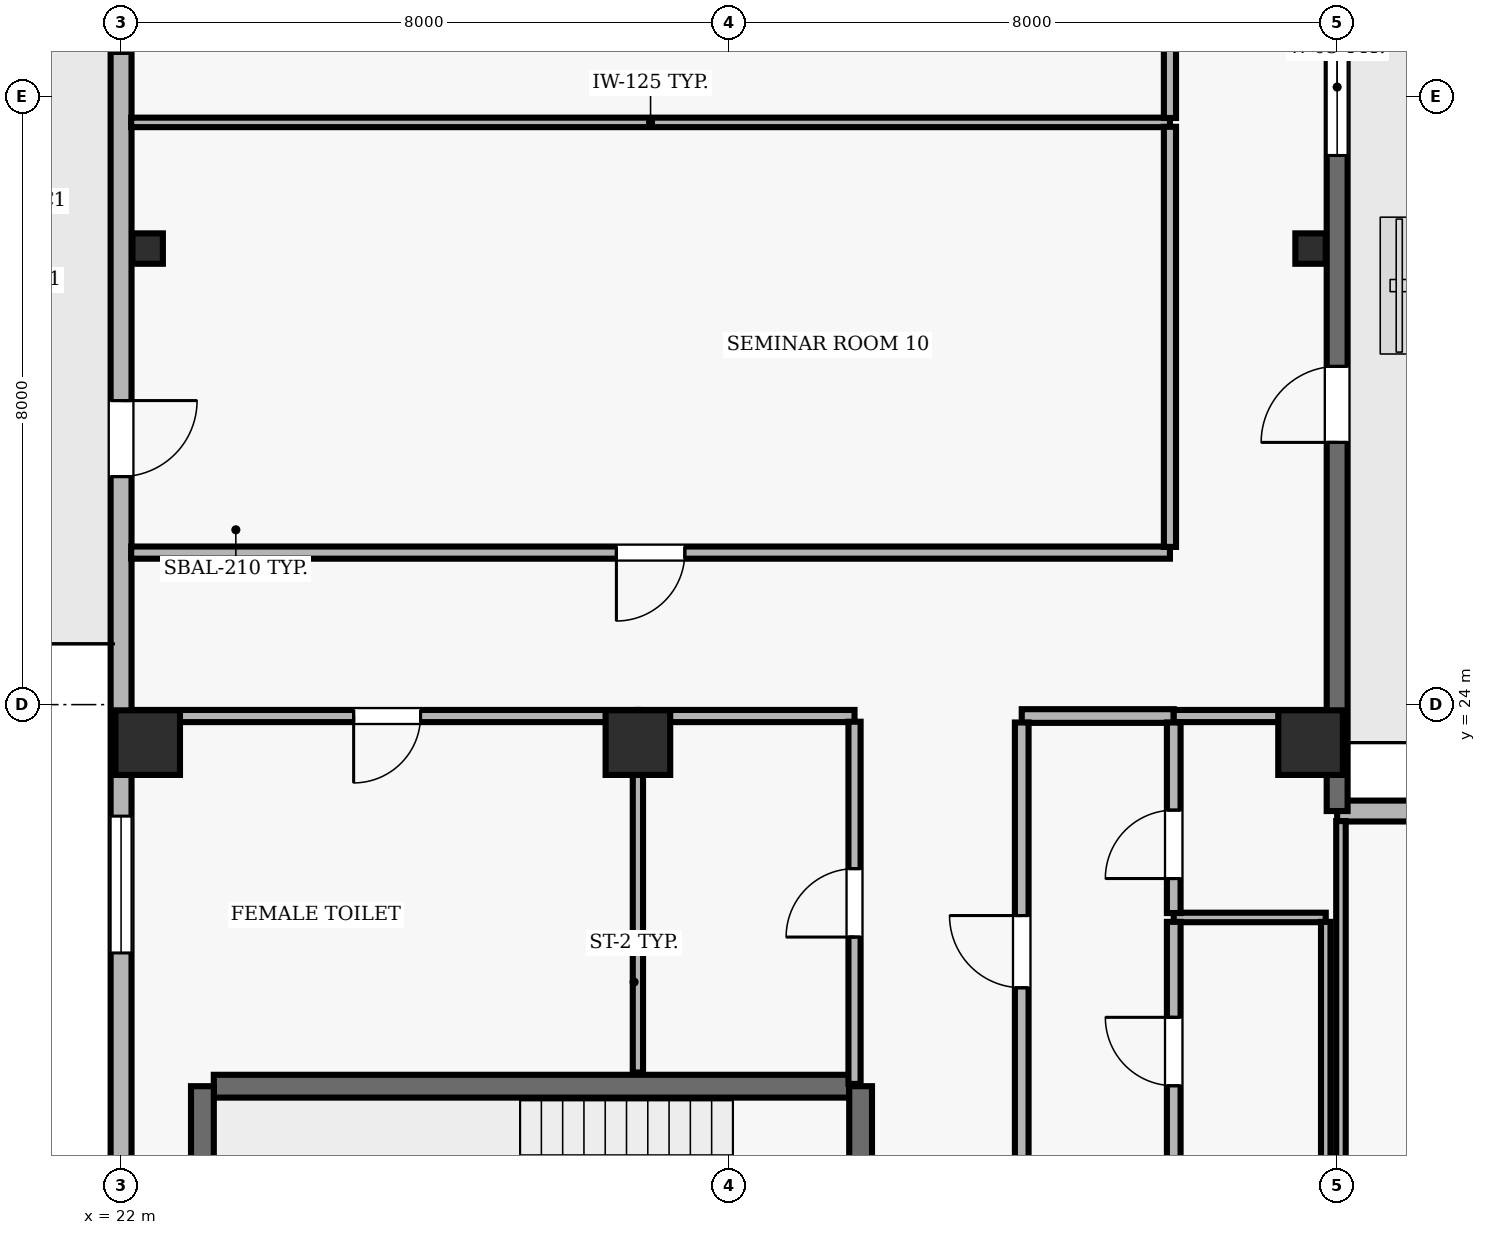
"""IFC4 building model, lengths in metres.
Left out: names, types, materials, properties, quantities, classifications, styles, units other than length and angle.
Written with IfcOpenShell. Run it as: python <this file> out.ifc"""

import sys

from ifc_helpers import new_model, si_unit, direction, frame, frame_2d, origin, origin_2d, place, context, subcontext, project, spatial, rectangle, hollow_rectangle, extrude, element, fill, save


model = new_model("IFC4")
c1 = context("Model", 3, precision=1e-05, world=origin(), true_north=direction((0.0, 1.0)))
c2 = subcontext(c1, "Body", "Model", "MODEL_VIEW")
j1 = project(units=[si_unit("LENGTHUNIT", "METRE"), si_unit("PLANEANGLEUNIT", "RADIAN")], contexts=[c1])
p1 = place(None, origin())
s1 = spatial("IfcSite", under=j1, at=p1, CompositionType="ELEMENT")
p2 = place(p1, origin())
s2 = spatial("IfcBuilding", under=s1, at=p2, CompositionType="ELEMENT")
p3 = place(p2, frame((0.0, 0.0, 271.6)))
s3 = spatial("IfcBuildingStorey", under=s2, at=p3, CompositionType="ELEMENT", Elevation=271.6)
for number, where, z_axis, x_axis in (
    (1, (22.35, 23.5, 0.0), (0.0, 0.0, 1.0), (1.0, 0.0, 0.0)),
    (2, (28.8, 23.5, 0.0), (0.0, 0.0, 1.0), (1.0, 0.0, 0.0)),
    (3, (37.65, 23.5, 0.0), (0.0, 0.0, 1.0), (1.0, 0.0, 0.0)),
):
    element("IfcColumn", number, at=place(p3, frame(where, z_axis=z_axis, x_axis=x_axis)), inside=s3, PredefinedType="COLUMN", context=c2, shape_type="SweptSolid", body=[
        extrude(rectangle(XDim=0.85, YDim=0.85, at=origin_2d()), origin(), (0.0, 0.0, 1.0), 3.9),
    ])
for number, where, z_axis, x_axis in (
    (4, (22.35, 30.0, 0.0), (0.0, 0.0, 1.0), (1.0, 0.0, 0.0)),
    (5, (37.65, 30.0, 0.0), (0.0, 0.0, 1.0), (1.0, 0.0, 0.0)),
):
    element("IfcColumn", number, at=place(p3, frame(where, z_axis=z_axis, x_axis=x_axis)), inside=s3, PredefinedType="COLUMN", context=c2, shape_type="SweptSolid", body=[
        extrude(hollow_rectangle(XDim=0.4, YDim=0.4, WallThickness=0.02, at=origin_2d()), origin(), (0.0, 0.0, 1.0), 3.9),
    ])
p4 = place(p3, frame((43.0, 22.6, 0.0), z_axis=(0.0, 0.0, 1.0), x_axis=(-1.0, 0.0, 0.0)))
e6 = element("IfcWall", 6, at=p4, inside=s3, PredefinedType="SOLIDWALL", context=c2, shape_type="SweptSolid", body=[
    extrude(rectangle(XDim=5.0, YDim=0.275, at=frame_2d((2.5, 0.0))), origin(), (0.0, 0.0, 1.0), 3.69),
])
p5 = place(p3, frame((38.0, 22.6, 0.0), z_axis=(0.0, 0.0, 1.0), x_axis=(0.0, 1.0, 0.0)))
e7 = element("IfcWall", 7, at=p5, inside=s3, PredefinedType="SOLIDWALL", context=c2, shape_type="SweptSolid", body=[
    extrude(rectangle(XDim=12.7, YDim=0.275, at=frame_2d((6.35, 0.0))), origin(), (0.0, 0.0, 1.0), 3.69),
])
p6 = place(p5, frame((4.85, 0.0, 0.0)))
e8 = element("IfcOpeningElement", 8, at=p6, cuts=e7, PredefinedType="OPENING", context=c2, shape_type="SweptSolid", body=[
    extrude(rectangle(XDim=1.0, YDim=2.2, at=frame_2d((0.5, 1.1))), frame((0.0, 0.147, 0.0), z_axis=(0.0, -1.0, 0.0), x_axis=(1.0, 0.0, 0.0)), (0.0, 0.0, 1.0), 0.295),
])
p7 = place(p5, frame((8.625, 0.0, 0.9)))
e9 = element("IfcOpeningElement", 9, at=p7, cuts=e7, PredefinedType="OPENING", context=c2, shape_type="SweptSolid", body=[
    extrude(rectangle(XDim=1.8, YDim=1.6, at=frame_2d((0.9, 0.8))), frame((0.0, 0.147, 0.0), z_axis=(0.0, -1.0, 0.0), x_axis=(1.0, 0.0, 0.0)), (0.0, 0.0, 1.0), 0.295),
])
p8 = place(p3, frame((22.0, 35.3, 0.0), z_axis=(0.0, 0.0, 1.0), x_axis=(0.0, -1.0, 0.0)))
e10 = element("IfcWall", 10, at=p8, inside=s3, PredefinedType="SOLIDWALL", context=c2, shape_type="SweptSolid", body=[
    extrude(rectangle(XDim=32.8, YDim=0.275, at=frame_2d((16.4, 0.0))), origin(), (0.0, 0.0, 1.0), 3.69),
])
p9 = place(p8, frame((7.3, 0.0, 0.0)))
e11 = element("IfcOpeningElement", 11, at=p9, cuts=e10, PredefinedType="OPENING", context=c2, shape_type="SweptSolid", body=[
    extrude(rectangle(XDim=1.0, YDim=2.2, at=frame_2d((0.5, 1.1))), frame((0.0, 0.147, 0.0), z_axis=(0.0, -1.0, 0.0), x_axis=(1.0, 0.0, 0.0)), (0.0, 0.0, 1.0), 0.295),
])
p10 = place(p8, frame((0.933, 0.0, 0.9)))
e12 = element("IfcOpeningElement", 12, at=p10, cuts=e10, PredefinedType="OPENING", context=c2, shape_type="SweptSolid", body=[
    extrude(rectangle(XDim=1.8, YDim=1.8, at=frame_2d((0.9, 0.9))), frame((0.0, 0.147, 0.0), z_axis=(0.0, -1.0, 0.0), x_axis=(1.0, 0.0, 0.0)), (0.0, 0.0, 1.0), 0.295),
])
p11 = place(p8, frame((12.767, 0.0, 0.9)))
e13 = element("IfcOpeningElement", 13, at=p11, cuts=e10, PredefinedType="OPENING", context=c2, shape_type="SweptSolid", body=[
    extrude(rectangle(XDim=1.8, YDim=1.8, at=frame_2d((0.9, 0.9))), frame((0.0, 0.147, 0.0), z_axis=(0.0, -1.0, 0.0), x_axis=(1.0, 0.0, 0.0)), (0.0, 0.0, 1.0), 0.295),
])
p12 = place(p8, frame((18.233, 0.0, 0.9)))
e14 = element("IfcOpeningElement", 14, at=p12, cuts=e10, PredefinedType="OPENING", context=c2, shape_type="SweptSolid", body=[
    extrude(rectangle(XDim=1.8, YDim=1.8, at=frame_2d((0.9, 0.9))), frame((0.0, 0.147, 0.0), z_axis=(0.0, -1.0, 0.0), x_axis=(1.0, 0.0, 0.0)), (0.0, 0.0, 1.0), 0.295),
])
p13 = place(p8, frame((23.7, 0.0, 0.9)))
e15 = element("IfcOpeningElement", 15, at=p13, cuts=e10, PredefinedType="OPENING", context=c2, shape_type="SweptSolid", body=[
    extrude(rectangle(XDim=1.8, YDim=1.8, at=frame_2d((0.9, 0.9))), frame((0.0, 0.147, 0.0), z_axis=(0.0, -1.0, 0.0), x_axis=(1.0, 0.0, 0.0)), (0.0, 0.0, 1.0), 0.295),
])
p14 = place(p3, frame((31.58, 18.98, 0.0), z_axis=(0.0, 0.0, 1.0), x_axis=(-1.0, 0.0, 0.0)))
e16 = element("IfcWall", 16, at=p14, inside=s3, PredefinedType="SHEAR", context=c2, shape_type="SweptSolid", body=[
    extrude(rectangle(XDim=8.36, YDim=0.3, at=frame_2d((4.18, 0.0))), origin(), (0.0, 0.0, 1.0), 3.69),
])
p15 = place(p3, frame((23.07, 18.98, 0.0), z_axis=(0.0, 0.0, 1.0), x_axis=(0.0, -1.0, 0.0)))
e17 = element("IfcWall", 17, at=p15, inside=s3, PredefinedType="SHEAR", context=c2, shape_type="SweptSolid", body=[
    extrude(rectangle(XDim=3.51, YDim=0.3, at=frame_2d((1.755, 0.0))), origin(), (0.0, 0.0, 1.0), 3.69),
])
p16 = place(p3, frame((31.73, 15.47, 0.0), z_axis=(0.0, 0.0, 1.0), x_axis=(0.0, 1.0, 0.0)))
e18 = element("IfcWall", 18, at=p16, inside=s3, PredefinedType="SHEAR", context=c2, shape_type="SweptSolid", body=[
    extrude(rectangle(XDim=3.51, YDim=0.3, at=frame_2d((1.755, 0.0))), origin(), (0.0, 0.0, 1.0), 3.69),
])
p17 = place(p16, frame((1.18, 0.0, 0.0)))
e19 = element("IfcOpeningElement", 19, at=p17, cuts=e18, PredefinedType="OPENING", context=c2, shape_type="SweptSolid", body=[
    extrude(rectangle(XDim=1.15, YDim=2.15, at=frame_2d((0.575, 1.075))), frame((0.0, 0.16, 0.0), z_axis=(0.0, -1.0, 0.0), x_axis=(1.0, 0.0, 0.0)), (0.0, 0.0, 1.0), 0.32),
])
p18 = place(p3, frame((28.8, 23.85, 0.0), z_axis=(0.0, 0.0, 1.0), x_axis=(-1.0, 0.0, 0.0)))
e20 = element("IfcWall", 20, at=p18, inside=s3, PredefinedType="PARTITIONING", context=c2, shape_type="SweptSolid", body=[
    extrude(rectangle(XDim=6.6, YDim=0.16, at=frame_2d((3.3, 0.0))), origin(), (0.0, 0.0, 1.0), 3.221),
])
p19 = place(p18, frame((2.86, 0.0, 0.0)))
e21 = element("IfcOpeningElement", 21, at=p19, cuts=e20, PredefinedType="OPENING", context=c2, shape_type="SweptSolid", body=[
    extrude(rectangle(XDim=0.88, YDim=2.1, at=frame_2d((0.44, 1.05))), frame((0.0, 0.09, 0.0), z_axis=(0.0, -1.0, 0.0), x_axis=(1.0, 0.0, 0.0)), (0.0, 0.0, 1.0), 0.18),
])
p20 = place(p3, frame((31.65, 23.85, 0.0), z_axis=(0.0, 0.0, 1.0), x_axis=(-1.0, 0.0, 0.0)))
e22 = element("IfcWall", 22, at=p20, inside=s3, PredefinedType="PARTITIONING", context=c2, shape_type="SweptSolid", body=[
    extrude(rectangle(XDim=2.85, YDim=0.16, at=frame_2d((1.425, 0.0))), origin(), (0.0, 0.0, 1.0), 3.221),
])
p21 = place(p3, frame((35.8, 26.0, 0.0), z_axis=(0.0, 0.0, 1.0), x_axis=(-1.0, 0.0, 0.0)))
e23 = element("IfcWall", 23, at=p21, inside=s3, PredefinedType="PARTITIONING", context=c2, shape_type="SweptSolid", body=[
    extrude(rectangle(XDim=13.667, YDim=0.16, at=frame_2d((6.833, 0.0))), origin(), (0.0, 0.0, 1.0), 3.69),
])
p22 = place(p21, frame((6.383, 0.0, 0.0)))
e24 = element("IfcOpeningElement", 24, at=p22, cuts=e23, PredefinedType="OPENING", context=c2, shape_type="SweptSolid", body=[
    extrude(rectangle(XDim=0.9, YDim=2.1, at=frame_2d((0.45, 1.05))), frame((0.0, 0.09, 0.0), z_axis=(0.0, -1.0, 0.0), x_axis=(1.0, 0.0, 0.0)), (0.0, 0.0, 1.0), 0.18),
])
p23 = place(p3, frame((35.8, 31.66, 0.0), z_axis=(0.0, 0.0, 1.0), x_axis=(-1.0, 0.0, 0.0)))
e25 = element("IfcWall", 25, at=p23, inside=s3, PredefinedType="PARTITIONING", context=c2, shape_type="SweptSolid", body=[
    extrude(rectangle(XDim=13.667, YDim=0.125, at=frame_2d((6.833, 0.0))), origin(), (0.0, 0.0, 1.0), 3.69),
])
p24 = place(p3, frame((35.85, 21.2, 0.0), z_axis=(0.0, 0.0, 1.0), x_axis=(1.0, 0.0, 0.0)))
e26 = element("IfcWall", 26, at=p24, inside=s3, PredefinedType="PARTITIONING", context=c2, shape_type="SweptSolid", body=[
    extrude(rectangle(XDim=2.0, YDim=0.125, at=frame_2d((1.0, 0.0))), origin(), (0.0, 0.0, 1.0), 3.69),
])
p25 = place(p3, frame((35.85, 23.85, 0.0), z_axis=(0.0, 0.0, 1.0), x_axis=(-1.0, 0.0, 0.0)))
e27 = element("IfcWall", 27, at=p25, inside=s3, PredefinedType="PARTITIONING", context=c2, shape_type="SweptSolid", body=[
    extrude(rectangle(XDim=2.0, YDim=0.18, at=frame_2d((1.0, 0.0))), origin(), (0.0, 0.0, 1.0), 3.221),
])
p26 = place(p3, frame((37.85, 23.85, 0.0), z_axis=(0.0, 0.0, 1.0), x_axis=(-1.0, 0.0, 0.0)))
e28 = element("IfcWall", 28, at=p26, inside=s3, PredefinedType="PARTITIONING", context=c2, shape_type="SweptSolid", body=[
    extrude(rectangle(XDim=2.0, YDim=0.16, at=frame_2d((1.0, 0.0))), origin(), (0.0, 0.0, 1.0), 3.221),
])
p27 = place(p3, frame((28.8, 23.775, 0.0), z_axis=(0.0, 0.0, 1.0), x_axis=(0.0, -1.0, 0.0)))
e29 = element("IfcWall", 29, at=p27, inside=s3, PredefinedType="PARTITIONING", context=c2, shape_type="SweptSolid", body=[
    extrude(rectangle(XDim=4.615, YDim=0.135, at=frame_2d((2.308, 0.0))), origin(), (0.0, 0.0, 1.0), 3.69),
])
p28 = place(p3, frame((31.65, 19.01, 0.0), z_axis=(0.0, 0.0, 1.0), x_axis=(0.0, 1.0, 0.0)))
e30 = element("IfcWall", 30, at=p28, inside=s3, PredefinedType="PARTITIONING", context=c2, shape_type="SweptSolid", body=[
    extrude(rectangle(XDim=4.765, YDim=0.16, at=frame_2d((2.382, 0.0))), origin(), (0.0, 0.0, 1.0), 3.69),
])
p29 = place(p28, frame((1.932, 0.0, 0.0)))
e31 = element("IfcOpeningElement", 31, at=p29, cuts=e30, PredefinedType="OPENING", context=c2, shape_type="SweptSolid", body=[
    extrude(rectangle(XDim=0.9, YDim=2.1, at=frame_2d((0.45, 1.05))), frame((0.0, 0.09, 0.0), z_axis=(0.0, -1.0, 0.0), x_axis=(1.0, 0.0, 0.0)), (0.0, 0.0, 1.0), 0.18),
])
p30 = place(p3, frame((33.85, 17.735, 0.0), z_axis=(0.0, 0.0, 1.0), x_axis=(0.0, 1.0, 0.0)))
e32 = element("IfcWall", 32, at=p30, inside=s3, PredefinedType="PARTITIONING", context=c2, shape_type="SweptSolid", body=[
    extrude(rectangle(XDim=6.03, YDim=0.18, at=frame_2d((3.015, 0.0))), origin(), (0.0, 0.0, 1.0), 3.69),
])
p31 = place(p30, frame((2.54, 0.0, 0.0)))
e33 = element("IfcOpeningElement", 33, at=p31, cuts=e32, PredefinedType="OPENING", context=c2, shape_type="SweptSolid", body=[
    extrude(rectangle(XDim=0.95, YDim=2.1, at=frame_2d((0.475, 1.05))), frame((0.0, 0.1, 0.0), z_axis=(0.0, -1.0, 0.0), x_axis=(1.0, 0.0, 0.0)), (0.0, 0.0, 1.0), 0.2),
])
p32 = place(p3, frame((35.8, 31.602, 0.0), z_axis=(0.0, 0.0, 1.0), x_axis=(0.0, -1.0, 0.0)))
e34 = element("IfcWall", 34, at=p32, inside=s3, PredefinedType="PARTITIONING", context=c2, shape_type="SweptSolid", body=[
    extrude(rectangle(XDim=5.527, YDim=0.16, at=frame_2d((2.764, 0.0))), origin(), (0.0, 0.0, 1.0), 3.69),
])
p33 = place(p3, frame((35.8, 37.313, 0.0), z_axis=(0.0, 0.0, 1.0), x_axis=(0.0, -1.0, 0.0)))
e35 = element("IfcWall", 35, at=p33, inside=s3, PredefinedType="PARTITIONING", context=c2, shape_type="SweptSolid", body=[
    extrude(rectangle(XDim=5.595, YDim=0.16, at=frame_2d((2.797, 0.0))), origin(), (0.0, 0.0, 1.0), 3.69),
])
p34 = place(p33, frame((2.348, 0.0, 0.0)))
e36 = element("IfcOpeningElement", 36, at=p34, cuts=e35, PredefinedType="OPENING", context=c2, shape_type="SweptSolid", body=[
    extrude(rectangle(XDim=0.9, YDim=2.1, at=frame_2d((0.45, 1.05))), frame((0.0, 0.09, 0.0), z_axis=(0.0, -1.0, 0.0), x_axis=(1.0, 0.0, 0.0)), (0.0, 0.0, 1.0), 0.18),
])
p35 = place(p3, frame((35.85, 17.73, 0.0), z_axis=(0.0, 0.0, 1.0), x_axis=(0.0, 1.0, 0.0)))
e37 = element("IfcWall", 37, at=p35, inside=s3, PredefinedType="PARTITIONING", context=c2, shape_type="SweptSolid", body=[
    extrude(rectangle(XDim=3.412, YDim=0.18, at=frame_2d((1.706, 0.0))), origin(), (0.0, 0.0, 1.0), 3.69),
])
p36 = place(p35, frame((1.256, 0.0, 0.0)))
e38 = element("IfcOpeningElement", 38, at=p36, cuts=e37, PredefinedType="OPENING", context=c2, shape_type="SweptSolid", body=[
    extrude(rectangle(XDim=0.9, YDim=2.1, at=frame_2d((0.45, 1.05))), frame((0.0, 0.1, 0.0), z_axis=(0.0, -1.0, 0.0), x_axis=(1.0, 0.0, 0.0)), (0.0, 0.0, 1.0), 0.2),
])
p37 = place(p3, frame((35.85, 21.258, 0.0), z_axis=(0.0, 0.0, 1.0), x_axis=(0.0, 1.0, 0.0)))
e39 = element("IfcWall", 39, at=p37, inside=s3, PredefinedType="PARTITIONING", context=c2, shape_type="SweptSolid", body=[
    extrude(rectangle(XDim=2.507, YDim=0.18, at=frame_2d((1.253, 0.0))), origin(), (0.0, 0.0, 1.0), 3.69),
])
p38 = place(p37, frame((0.454, 0.0, 0.0)))
e40 = element("IfcOpeningElement", 40, at=p38, cuts=e39, PredefinedType="OPENING", context=c2, shape_type="SweptSolid", body=[
    extrude(rectangle(XDim=0.9, YDim=2.1, at=frame_2d((0.45, 1.05))), frame((0.0, 0.1, 0.0), z_axis=(0.0, -1.0, 0.0), x_axis=(1.0, 0.0, 0.0)), (0.0, 0.0, 1.0), 0.2),
])
p39 = place(p3, frame((37.85, 17.65, 0.0), z_axis=(0.0, 0.0, 1.0), x_axis=(0.0, 1.0, 0.0)))
e41 = element("IfcWall", 41, at=p39, inside=s3, PredefinedType="PARTITIONING", context=c2, shape_type="SweptSolid", body=[
    extrude(rectangle(XDim=3.492, YDim=0.125, at=frame_2d((1.746, 0.0))), origin(), (0.0, 0.0, 1.0), 3.221),
])
p40 = place(p3, frame((38.05, 22.468, 0.0), z_axis=(0.0, 0.0, 1.0), x_axis=(0.0, -1.0, 0.0)))
e42 = element("IfcWall", 42, at=p40, inside=s3, PredefinedType="PARTITIONING", context=c2, shape_type="SweptSolid", body=[
    extrude(rectangle(XDim=6.393, YDim=0.125, at=frame_2d((3.197, 0.0))), origin(), (0.0, 0.0, 1.0), 3.221),
])
p41 = place(p6, origin())
e43 = element("IfcDoor", 43, at=p41, inside=s3, OperationType="SINGLE_SWING_LEFT", PredefinedType="DOOR", context=c2, shape_type="SweptSolid", body=[
    extrude(rectangle(XDim=1.0, YDim=2.2, at=frame_2d((0.5, 1.1))), frame((0.0, 0.025, 0.0), z_axis=(0.0, -1.0, 0.0), x_axis=(1.0, 0.0, 0.0)), (0.0, 0.0, 1.0), 0.05),
])
fill(e8, e43)
p42 = place(p7, origin())
e44 = element("IfcWindow", 44, at=p42, inside=s3, PartitioningType="SINGLE_PANEL", PredefinedType="WINDOW", context=c2, shape_type="SweptSolid", body=[
    extrude(rectangle(XDim=1.8, YDim=1.6, at=frame_2d((0.9, 0.8))), frame((0.0, 0.03, 0.0), z_axis=(0.0, -1.0, 0.0), x_axis=(1.0, 0.0, 0.0)), (0.0, 0.0, 1.0), 0.06),
])
fill(e9, e44)
p43 = place(p9, origin())
e45 = element("IfcDoor", 45, at=p43, inside=s3, OperationType="SINGLE_SWING_LEFT", PredefinedType="DOOR", context=c2, shape_type="SweptSolid", body=[
    extrude(rectangle(XDim=1.0, YDim=2.2, at=frame_2d((0.5, 1.1))), frame((0.0, 0.025, 0.0), z_axis=(0.0, -1.0, 0.0), x_axis=(1.0, 0.0, 0.0)), (0.0, 0.0, 1.0), 0.05),
])
fill(e11, e45)
p44 = place(p10, origin())
e46 = element("IfcWindow", 46, at=p44, inside=s3, PartitioningType="SINGLE_PANEL", PredefinedType="WINDOW", context=c2, shape_type="SweptSolid", body=[
    extrude(rectangle(XDim=1.8, YDim=1.8, at=frame_2d((0.9, 0.9))), frame((0.0, 0.03, 0.0), z_axis=(0.0, -1.0, 0.0), x_axis=(1.0, 0.0, 0.0)), (0.0, 0.0, 1.0), 0.06),
])
fill(e12, e46)
p45 = place(p11, origin())
e47 = element("IfcWindow", 47, at=p45, inside=s3, PartitioningType="SINGLE_PANEL", PredefinedType="WINDOW", context=c2, shape_type="SweptSolid", body=[
    extrude(rectangle(XDim=1.8, YDim=1.8, at=frame_2d((0.9, 0.9))), frame((0.0, 0.03, 0.0), z_axis=(0.0, -1.0, 0.0), x_axis=(1.0, 0.0, 0.0)), (0.0, 0.0, 1.0), 0.06),
])
fill(e13, e47)
p46 = place(p31, origin())
e48 = element("IfcDoor", 48, at=p46, inside=s3, OperationType="SINGLE_SWING_RIGHT", PredefinedType="DOOR", context=c2, shape_type="SweptSolid", body=[
    extrude(rectangle(XDim=0.95, YDim=2.1, at=frame_2d((0.475, 1.05))), frame((0.0, 0.025, 0.0), z_axis=(0.0, -1.0, 0.0), x_axis=(1.0, 0.0, 0.0)), (0.0, 0.0, 1.0), 0.05),
])
fill(e33, e48)
p47 = place(p38, origin())
e49 = element("IfcDoor", 49, at=p47, inside=s3, OperationType="SINGLE_SWING_LEFT", PredefinedType="DOOR", context=c2, shape_type="SweptSolid", body=[
    extrude(rectangle(XDim=0.9, YDim=2.1, at=frame_2d((0.45, 1.05))), frame((0.0, 0.025, 0.0), z_axis=(0.0, -1.0, 0.0), x_axis=(1.0, 0.0, 0.0)), (0.0, 0.0, 1.0), 0.05),
])
fill(e40, e49)
p48 = place(p36, origin())
e50 = element("IfcDoor", 50, at=p48, inside=s3, OperationType="SINGLE_SWING_RIGHT", PredefinedType="DOOR", context=c2, shape_type="SweptSolid", body=[
    extrude(rectangle(XDim=0.9, YDim=2.1, at=frame_2d((0.45, 1.05))), frame((0.0, 0.025, 0.0), z_axis=(0.0, -1.0, 0.0), x_axis=(1.0, 0.0, 0.0)), (0.0, 0.0, 1.0), 0.05),
])
fill(e38, e50)
p49 = place(p29, origin())
e51 = element("IfcDoor", 51, at=p49, inside=s3, OperationType="SINGLE_SWING_LEFT", PredefinedType="DOOR", context=c2, shape_type="SweptSolid", body=[
    extrude(rectangle(XDim=0.9, YDim=2.1, at=frame_2d((0.45, 1.05))), frame((0.0, 0.025, 0.0), z_axis=(0.0, -1.0, 0.0), x_axis=(1.0, 0.0, 0.0)), (0.0, 0.0, 1.0), 0.05),
])
fill(e31, e51)
p50 = place(p19, origin())
e52 = element("IfcDoor", 52, at=p50, inside=s3, OperationType="SINGLE_SWING_RIGHT", PredefinedType="DOOR", context=c2, shape_type="SweptSolid", body=[
    extrude(rectangle(XDim=0.88, YDim=2.1, at=frame_2d((0.44, 1.05))), frame((0.0, 0.025, 0.0), z_axis=(0.0, -1.0, 0.0), x_axis=(1.0, 0.0, 0.0)), (0.0, 0.0, 1.0), 0.05),
])
fill(e21, e52)
p51 = place(p22, origin())
e53 = element("IfcDoor", 53, at=p51, inside=s3, OperationType="SINGLE_SWING_RIGHT", PredefinedType="DOOR", context=c2, shape_type="SweptSolid", body=[
    extrude(rectangle(XDim=0.9, YDim=2.1, at=frame_2d((0.45, 1.05))), frame((0.0, 0.025, 0.0), z_axis=(0.0, -1.0, 0.0), x_axis=(1.0, 0.0, 0.0)), (0.0, 0.0, 1.0), 0.05),
])
fill(e24, e53)
save(model, sys.argv[1])
